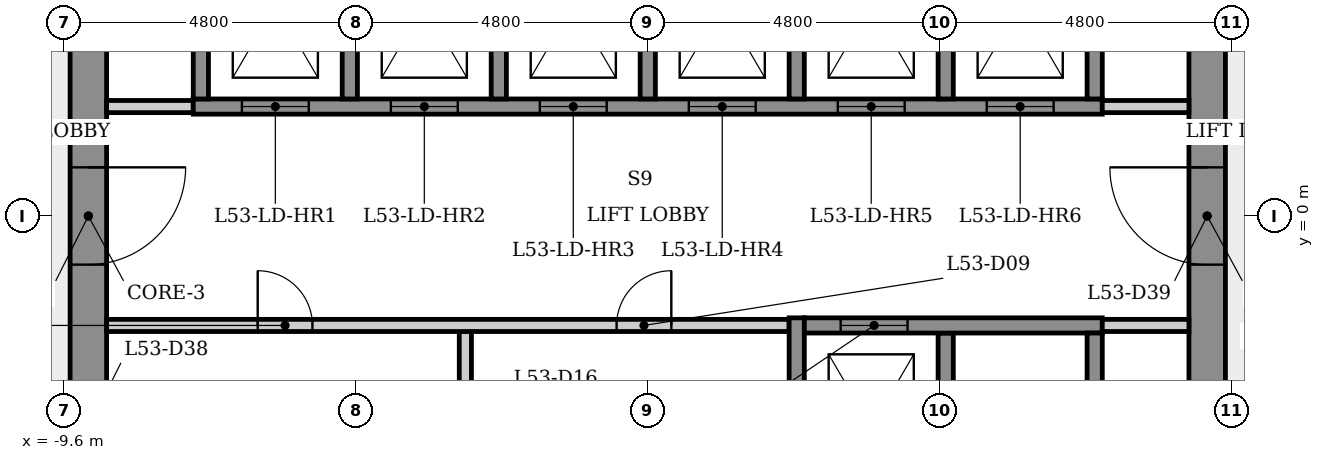
"""IFC4 building model, lengths in metres.
Left out: names, types, materials, properties, quantities, classifications, styles, units other than length and angle.
Written with IfcOpenShell. Run it as: python <this file> out.ifc"""

import sys

from ifc_helpers import new_model, si_unit, direction, frame, frame_2d, origin, place, context, subcontext, project, spatial, rectangle, extrude, element, fill, save


model = new_model("IFC4")
c1 = context("Model", 3, precision=1e-05, world=origin(), true_north=direction((0.0, 1.0)))
c2 = subcontext(c1, "Body", "Model", "MODEL_VIEW")
j1 = project(units=[si_unit("LENGTHUNIT", "METRE"), si_unit("PLANEANGLEUNIT", "RADIAN")], contexts=[c1])
p1 = place(None, origin())
s1 = spatial("IfcSite", under=j1, at=p1, CompositionType="ELEMENT")
p2 = place(p1, origin())
s2 = spatial("IfcBuilding", under=s1, at=p2, CompositionType="ELEMENT")
p3 = place(p2, frame((0.0, 0.0, 198.7)))
s3 = spatial("IfcBuildingStorey", under=s2, at=p3, CompositionType="ELEMENT", Elevation=198.7)
p4 = place(p3, frame((9.2, -5.485, 0.0), z_axis=(0.0, 0.0, 1.0), x_axis=(0.0, 1.0, 0.0)))
e1 = element("IfcWall", 1, at=p4, inside=s3, PredefinedType="SHEAR", context=c2, shape_type="SweptSolid", body=[
    extrude(rectangle(XDim=10.97, YDim=0.6, at=frame_2d((5.485, 0.0))), origin(), (0.0, 0.0, 1.0), 3.4),
])
p5 = place(p4, frame((4.685, 0.0, 0.0)))
e2 = element("IfcOpeningElement", 2, at=p5, cuts=e1, PredefinedType="OPENING", context=c2, shape_type="SweptSolid", body=[
    extrude(rectangle(XDim=1.6, YDim=2.1, at=frame_2d((0.8, 1.05))), frame((0.0, 0.31, 0.0), z_axis=(0.0, -1.0, 0.0), x_axis=(1.0, 0.0, 0.0)), (0.0, 0.0, 1.0), 0.62),
])
p6 = place(p3, frame((-9.2, 5.485, 0.0), z_axis=(0.0, 0.0, 1.0), x_axis=(0.0, -1.0, 0.0)))
e3 = element("IfcWall", 3, at=p6, inside=s3, PredefinedType="SHEAR", context=c2, shape_type="SweptSolid", body=[
    extrude(rectangle(XDim=10.97, YDim=0.6, at=frame_2d((5.485, 0.0))), origin(), (0.0, 0.0, 1.0), 3.4),
])
p7 = place(p6, frame((8.516, 0.0, 0.0)))
e4 = element("IfcOpeningElement", 4, at=p7, cuts=e3, PredefinedType="OPENING", context=c2, shape_type="SweptSolid", body=[
    extrude(rectangle(XDim=0.9, YDim=2.1, at=frame_2d((0.45, 1.05))), frame((0.0, 0.31, 0.0), z_axis=(0.0, -1.0, 0.0), x_axis=(1.0, 0.0, 0.0)), (0.0, 0.0, 1.0), 0.62),
])
p8 = place(p6, frame((4.685, 0.0, 0.0)))
e5 = element("IfcOpeningElement", 5, at=p8, cuts=e3, PredefinedType="OPENING", context=c2, shape_type="SweptSolid", body=[
    extrude(rectangle(XDim=1.6, YDim=2.1, at=frame_2d((0.8, 1.05))), frame((0.0, 0.31, 0.0), z_axis=(0.0, -1.0, 0.0), x_axis=(1.0, 0.0, 0.0)), (0.0, 0.0, 1.0), 0.62),
])
p9 = place(p3, frame((-8.9, 1.8, 0.0), z_axis=(0.0, 0.0, 1.0), x_axis=(1.0, 0.0, 0.0)))
e6 = element("IfcWall", 6, at=p9, inside=s3, PredefinedType="PARTITIONING", context=c2, shape_type="SweptSolid", body=[
    extrude(rectangle(XDim=1.425, YDim=0.2, at=frame_2d((0.712, 0.0))), origin(), (0.0, 0.0, 1.0), 3.0),
])
p10 = place(p3, frame((-7.475, 1.8, 0.0), z_axis=(0.0, 0.0, 1.0), x_axis=(1.0, 0.0, 0.0)))
e7 = element("IfcWall", 7, at=p10, inside=s3, PredefinedType="SHEAR", context=c2, shape_type="SweptSolid", body=[
    extrude(rectangle(XDim=14.95, YDim=0.25, at=frame_2d((7.475, 0.0))), origin(), (0.0, 0.0, 1.0), 3.0),
])
p11 = place(p10, frame((0.8, 0.0, 0.0)))
e8 = element("IfcOpeningElement", 8, at=p11, cuts=e7, PredefinedType="OPENING", context=c2, shape_type="SweptSolid", body=[
    extrude(rectangle(XDim=1.1, YDim=2.1, at=frame_2d((0.55, 1.05))), frame((0.0, 0.135, 0.0), z_axis=(0.0, -1.0, 0.0), x_axis=(1.0, 0.0, 0.0)), (0.0, 0.0, 1.0), 0.27),
])
p12 = place(p10, frame((3.25, 0.0, 0.0)))
e9 = element("IfcOpeningElement", 9, at=p12, cuts=e7, PredefinedType="OPENING", context=c2, shape_type="SweptSolid", body=[
    extrude(rectangle(XDim=1.1, YDim=2.1, at=frame_2d((0.55, 1.05))), frame((0.0, 0.135, 0.0), z_axis=(0.0, -1.0, 0.0), x_axis=(1.0, 0.0, 0.0)), (0.0, 0.0, 1.0), 0.27),
])
p13 = place(p10, frame((5.7, 0.0, 0.0)))
e10 = element("IfcOpeningElement", 10, at=p13, cuts=e7, PredefinedType="OPENING", context=c2, shape_type="SweptSolid", body=[
    extrude(rectangle(XDim=1.1, YDim=2.1, at=frame_2d((0.55, 1.05))), frame((0.0, 0.135, 0.0), z_axis=(0.0, -1.0, 0.0), x_axis=(1.0, 0.0, 0.0)), (0.0, 0.0, 1.0), 0.27),
])
p14 = place(p10, frame((8.15, 0.0, 0.0)))
e11 = element("IfcOpeningElement", 11, at=p14, cuts=e7, PredefinedType="OPENING", context=c2, shape_type="SweptSolid", body=[
    extrude(rectangle(XDim=1.1, YDim=2.1, at=frame_2d((0.55, 1.05))), frame((0.0, 0.135, 0.0), z_axis=(0.0, -1.0, 0.0), x_axis=(1.0, 0.0, 0.0)), (0.0, 0.0, 1.0), 0.27),
])
p15 = place(p10, frame((10.6, 0.0, 0.0)))
e12 = element("IfcOpeningElement", 12, at=p15, cuts=e7, PredefinedType="OPENING", context=c2, shape_type="SweptSolid", body=[
    extrude(rectangle(XDim=1.1, YDim=2.1, at=frame_2d((0.55, 1.05))), frame((0.0, 0.135, 0.0), z_axis=(0.0, -1.0, 0.0), x_axis=(1.0, 0.0, 0.0)), (0.0, 0.0, 1.0), 0.27),
])
p16 = place(p10, frame((13.05, 0.0, 0.0)))
e13 = element("IfcOpeningElement", 13, at=p16, cuts=e7, PredefinedType="OPENING", context=c2, shape_type="SweptSolid", body=[
    extrude(rectangle(XDim=1.1, YDim=2.1, at=frame_2d((0.55, 1.05))), frame((0.0, 0.135, 0.0), z_axis=(0.0, -1.0, 0.0), x_axis=(1.0, 0.0, 0.0)), (0.0, 0.0, 1.0), 0.27),
])
p17 = place(p3, frame((-7.35, 1.925, 0.0), z_axis=(0.0, 0.0, 1.0), x_axis=(0.0, 1.0, 0.0)))
e14 = element("IfcWall", 14, at=p17, inside=s3, PredefinedType="SHEAR", context=c2, shape_type="SweptSolid", body=[
    extrude(rectangle(XDim=4.036, YDim=0.25, at=frame_2d((2.018, 0.0))), origin(), (0.0, 0.0, 1.0), 3.0),
])
p18 = place(p3, frame((-4.9, 5.025, 0.0), z_axis=(0.0, 0.0, 1.0), x_axis=(0.0, -1.0, 0.0)))
e15 = element("IfcWall", 15, at=p18, inside=s3, PredefinedType="SHEAR", context=c2, shape_type="SweptSolid", body=[
    extrude(rectangle(XDim=3.1, YDim=0.25, at=frame_2d((1.55, 0.0))), origin(), (0.0, 0.0, 1.0), 3.4),
])
p19 = place(p3, frame((-3.0, -1.9, 0.0), z_axis=(0.0, 0.0, 1.0), x_axis=(0.0, -1.0, 0.0)))
e16 = element("IfcWall", 16, at=p19, inside=s3, PredefinedType="PARTITIONING", context=c2, shape_type="SweptSolid", body=[
    extrude(rectangle(XDim=3.15, YDim=0.2, at=frame_2d((1.575, 0.0))), origin(), (0.0, 0.0, 1.0), 3.0),
])
p20 = place(p3, frame((-8.9, -1.8, 0.0), z_axis=(0.0, 0.0, 1.0), x_axis=(1.0, 0.0, 0.0)))
e17 = element("IfcWall", 17, at=p20, inside=s3, PredefinedType="PARTITIONING", context=c2, shape_type="SweptSolid", body=[
    extrude(rectangle(XDim=11.225, YDim=0.2, at=frame_2d((5.613, 0.0))), origin(), (0.0, 0.0, 1.0), 3.0),
])
p21 = place(p20, frame((2.485, 0.0, 0.0)))
e18 = element("IfcOpeningElement", 18, at=p21, cuts=e17, PredefinedType="OPENING", context=c2, shape_type="SweptSolid", body=[
    extrude(rectangle(XDim=0.9, YDim=2.1, at=frame_2d((0.45, 1.05))), frame((0.0, 0.11, 0.0), z_axis=(0.0, -1.0, 0.0), x_axis=(1.0, 0.0, 0.0)), (0.0, 0.0, 1.0), 0.22),
])
p22 = place(p20, frame((8.387, 0.0, 0.0)))
e19 = element("IfcOpeningElement", 19, at=p22, cuts=e17, PredefinedType="OPENING", context=c2, shape_type="SweptSolid", body=[
    extrude(rectangle(XDim=0.9, YDim=2.1, at=frame_2d((0.45, 1.05))), frame((0.0, 0.11, 0.0), z_axis=(0.0, -1.0, 0.0), x_axis=(1.0, 0.0, 0.0)), (0.0, 0.0, 1.0), 0.22),
])
for number, where, z_axis, x_axis in (
    (20, (-2.45, 5.025, 0.0), (0.0, 0.0, 1.0), (0.0, -1.0, 0.0)),
    (21, (0.0, 5.025, 0.0), (0.0, 0.0, 1.0), (0.0, -1.0, 0.0)),
):
    element("IfcWall", number, at=place(p3, frame(where, z_axis=z_axis, x_axis=x_axis)), inside=s3, PredefinedType="SHEAR", context=c2, shape_type="SweptSolid", body=[
        extrude(rectangle(XDim=3.1, YDim=0.25, at=frame_2d((1.55, 0.0))), origin(), (0.0, 0.0, 1.0), 3.4),
    ])
p23 = place(p3, frame((2.45, -5.275, 0.0), z_axis=(0.0, 0.0, 1.0), x_axis=(0.0, 1.0, 0.0)))
e22 = element("IfcWall", 22, at=p23, inside=s3, PredefinedType="SHEAR", context=c2, shape_type="SweptSolid", body=[
    extrude(rectangle(XDim=3.6, YDim=0.25, at=frame_2d((1.8, 0.0))), origin(), (0.0, 0.0, 1.0), 3.0),
])
for number, where, z_axis, x_axis in (
    (23, (2.45, 5.025, 0.0), (0.0, 0.0, 1.0), (0.0, -1.0, 0.0)),
    (24, (4.9, -1.925, 0.0), (0.0, 0.0, 1.0), (0.0, -1.0, 0.0)),
    (25, (4.9, 5.025, 0.0), (0.0, 0.0, 1.0), (0.0, -1.0, 0.0)),
):
    element("IfcWall", number, at=place(p3, frame(where, z_axis=z_axis, x_axis=x_axis)), inside=s3, PredefinedType="SHEAR", context=c2, shape_type="SweptSolid", body=[
        extrude(rectangle(XDim=3.1, YDim=0.25, at=frame_2d((1.55, 0.0))), origin(), (0.0, 0.0, 1.0), 3.4),
    ])
p24 = place(p3, frame((2.575, -1.8, 0.0), z_axis=(0.0, 0.0, 1.0), x_axis=(1.0, 0.0, 0.0)))
e26 = element("IfcWall", 26, at=p24, inside=s3, PredefinedType="SHEAR", context=c2, shape_type="SweptSolid", body=[
    extrude(rectangle(XDim=4.9, YDim=0.25, at=frame_2d((2.45, 0.0))), origin(), (0.0, 0.0, 1.0), 3.0),
])
p25 = place(p24, frame((0.597, 0.0, 0.0)))
e27 = element("IfcOpeningElement", 27, at=p25, cuts=e26, PredefinedType="OPENING", context=c2, shape_type="SweptSolid", body=[
    extrude(rectangle(XDim=1.1, YDim=2.1, at=frame_2d((0.55, 1.05))), frame((0.0, 0.135, 0.0), z_axis=(0.0, -1.0, 0.0), x_axis=(1.0, 0.0, 0.0)), (0.0, 0.0, 1.0), 0.27),
])
p26 = place(p3, frame((7.475, 1.8, 0.0), z_axis=(0.0, 0.0, 1.0), x_axis=(1.0, 0.0, 0.0)))
e28 = element("IfcWall", 28, at=p26, inside=s3, PredefinedType="PARTITIONING", context=c2, shape_type="SweptSolid", body=[
    extrude(rectangle(XDim=1.425, YDim=0.2, at=frame_2d((0.712, 0.0))), origin(), (0.0, 0.0, 1.0), 3.0),
])
for number, where, z_axis, x_axis in (
    (29, (7.35, -1.925, 0.0), (0.0, 0.0, 1.0), (0.0, -1.0, 0.0)),
    (30, (7.35, 5.025, 0.0), (0.0, 0.0, 1.0), (0.0, -1.0, 0.0)),
):
    element("IfcWall", number, at=place(p3, frame(where, z_axis=z_axis, x_axis=x_axis)), inside=s3, PredefinedType="SHEAR", context=c2, shape_type="SweptSolid", body=[
        extrude(rectangle(XDim=3.1, YDim=0.25, at=frame_2d((1.55, 0.0))), origin(), (0.0, 0.0, 1.0), 3.4),
    ])
p27 = place(p3, frame((8.9, -1.8, 0.0), z_axis=(0.0, 0.0, 1.0), x_axis=(-1.0, 0.0, 0.0)))
e31 = element("IfcWall", 31, at=p27, inside=s3, PredefinedType="PARTITIONING", context=c2, shape_type="SweptSolid", body=[
    extrude(rectangle(XDim=1.425, YDim=0.2, at=frame_2d((0.712, 0.0))), origin(), (0.0, 0.0, 1.0), 3.0),
])
p28 = place(p11, origin())
e32 = element("IfcDoor", 32, at=p28, inside=s3, OperationType="SLIDING_TO_LEFT", PredefinedType="DOOR", context=c2, shape_type="SweptSolid", body=[
    extrude(rectangle(XDim=1.1, YDim=2.1, at=frame_2d((0.55, 1.05))), frame((0.0, 0.025, 0.0), z_axis=(0.0, -1.0, 0.0), x_axis=(1.0, 0.0, 0.0)), (0.0, 0.0, 1.0), 0.05),
])
fill(e8, e32)
p29 = place(p12, origin())
e33 = element("IfcDoor", 33, at=p29, inside=s3, OperationType="SLIDING_TO_LEFT", PredefinedType="DOOR", context=c2, shape_type="SweptSolid", body=[
    extrude(rectangle(XDim=1.1, YDim=2.1, at=frame_2d((0.55, 1.05))), frame((0.0, 0.025, 0.0), z_axis=(0.0, -1.0, 0.0), x_axis=(1.0, 0.0, 0.0)), (0.0, 0.0, 1.0), 0.05),
])
fill(e9, e33)
p30 = place(p13, origin())
e34 = element("IfcDoor", 34, at=p30, inside=s3, OperationType="SLIDING_TO_LEFT", PredefinedType="DOOR", context=c2, shape_type="SweptSolid", body=[
    extrude(rectangle(XDim=1.1, YDim=2.1, at=frame_2d((0.55, 1.05))), frame((0.0, 0.025, 0.0), z_axis=(0.0, -1.0, 0.0), x_axis=(1.0, 0.0, 0.0)), (0.0, 0.0, 1.0), 0.05),
])
fill(e10, e34)
p31 = place(p14, origin())
e35 = element("IfcDoor", 35, at=p31, inside=s3, OperationType="SLIDING_TO_LEFT", PredefinedType="DOOR", context=c2, shape_type="SweptSolid", body=[
    extrude(rectangle(XDim=1.1, YDim=2.1, at=frame_2d((0.55, 1.05))), frame((0.0, 0.025, 0.0), z_axis=(0.0, -1.0, 0.0), x_axis=(1.0, 0.0, 0.0)), (0.0, 0.0, 1.0), 0.05),
])
fill(e11, e35)
p32 = place(p15, origin())
e36 = element("IfcDoor", 36, at=p32, inside=s3, OperationType="SLIDING_TO_LEFT", PredefinedType="DOOR", context=c2, shape_type="SweptSolid", body=[
    extrude(rectangle(XDim=1.1, YDim=2.1, at=frame_2d((0.55, 1.05))), frame((0.0, 0.025, 0.0), z_axis=(0.0, -1.0, 0.0), x_axis=(1.0, 0.0, 0.0)), (0.0, 0.0, 1.0), 0.05),
])
fill(e12, e36)
p33 = place(p16, origin())
e37 = element("IfcDoor", 37, at=p33, inside=s3, OperationType="SLIDING_TO_LEFT", PredefinedType="DOOR", context=c2, shape_type="SweptSolid", body=[
    extrude(rectangle(XDim=1.1, YDim=2.1, at=frame_2d((0.55, 1.05))), frame((0.0, 0.025, 0.0), z_axis=(0.0, -1.0, 0.0), x_axis=(1.0, 0.0, 0.0)), (0.0, 0.0, 1.0), 0.05),
])
fill(e13, e37)
p34 = place(p25, origin())
e38 = element("IfcDoor", 38, at=p34, inside=s3, OperationType="SLIDING_TO_LEFT", PredefinedType="DOOR", context=c2, shape_type="SweptSolid", body=[
    extrude(rectangle(XDim=1.1, YDim=2.1, at=frame_2d((0.55, 1.05))), frame((0.0, 0.025, 0.0), z_axis=(0.0, -1.0, 0.0), x_axis=(1.0, 0.0, 0.0)), (0.0, 0.0, 1.0), 0.05),
])
fill(e27, e38)
p35 = place(p21, origin())
e39 = element("IfcDoor", 39, at=p35, inside=s3, OperationType="SINGLE_SWING_LEFT", PredefinedType="DOOR", context=c2, shape_type="SweptSolid", body=[
    extrude(rectangle(XDim=0.9, YDim=2.1, at=frame_2d((0.45, 1.05))), frame((0.0, 0.025, 0.0), z_axis=(0.0, -1.0, 0.0), x_axis=(1.0, 0.0, 0.0)), (0.0, 0.0, 1.0), 0.05),
])
fill(e18, e39)
p36 = place(p22, origin())
e40 = element("IfcDoor", 40, at=p36, inside=s3, OperationType="SINGLE_SWING_RIGHT", PredefinedType="DOOR", context=c2, shape_type="SweptSolid", body=[
    extrude(rectangle(XDim=0.9, YDim=2.1, at=frame_2d((0.45, 1.05))), frame((0.0, 0.025, 0.0), z_axis=(0.0, -1.0, 0.0), x_axis=(1.0, 0.0, 0.0)), (0.0, 0.0, 1.0), 0.05),
])
fill(e19, e40)
p37 = place(p5, origin())
e41 = element("IfcDoor", 41, at=p37, inside=s3, OperationType="SINGLE_SWING_RIGHT", PredefinedType="DOOR", context=c2, shape_type="SweptSolid", body=[
    extrude(rectangle(XDim=1.6, YDim=2.1, at=frame_2d((0.8, 1.05))), frame((0.0, 0.025, 0.0), z_axis=(0.0, -1.0, 0.0), x_axis=(1.0, 0.0, 0.0)), (0.0, 0.0, 1.0), 0.05),
])
fill(e2, e41)
p38 = place(p8, origin())
e42 = element("IfcDoor", 42, at=p38, inside=s3, OperationType="SINGLE_SWING_LEFT", PredefinedType="DOOR", context=c2, shape_type="SweptSolid", body=[
    extrude(rectangle(XDim=1.6, YDim=2.1, at=frame_2d((0.8, 1.05))), frame((0.0, 0.025, 0.0), z_axis=(0.0, -1.0, 0.0), x_axis=(1.0, 0.0, 0.0)), (0.0, 0.0, 1.0), 0.05),
])
fill(e5, e42)
save(model, sys.argv[1])
